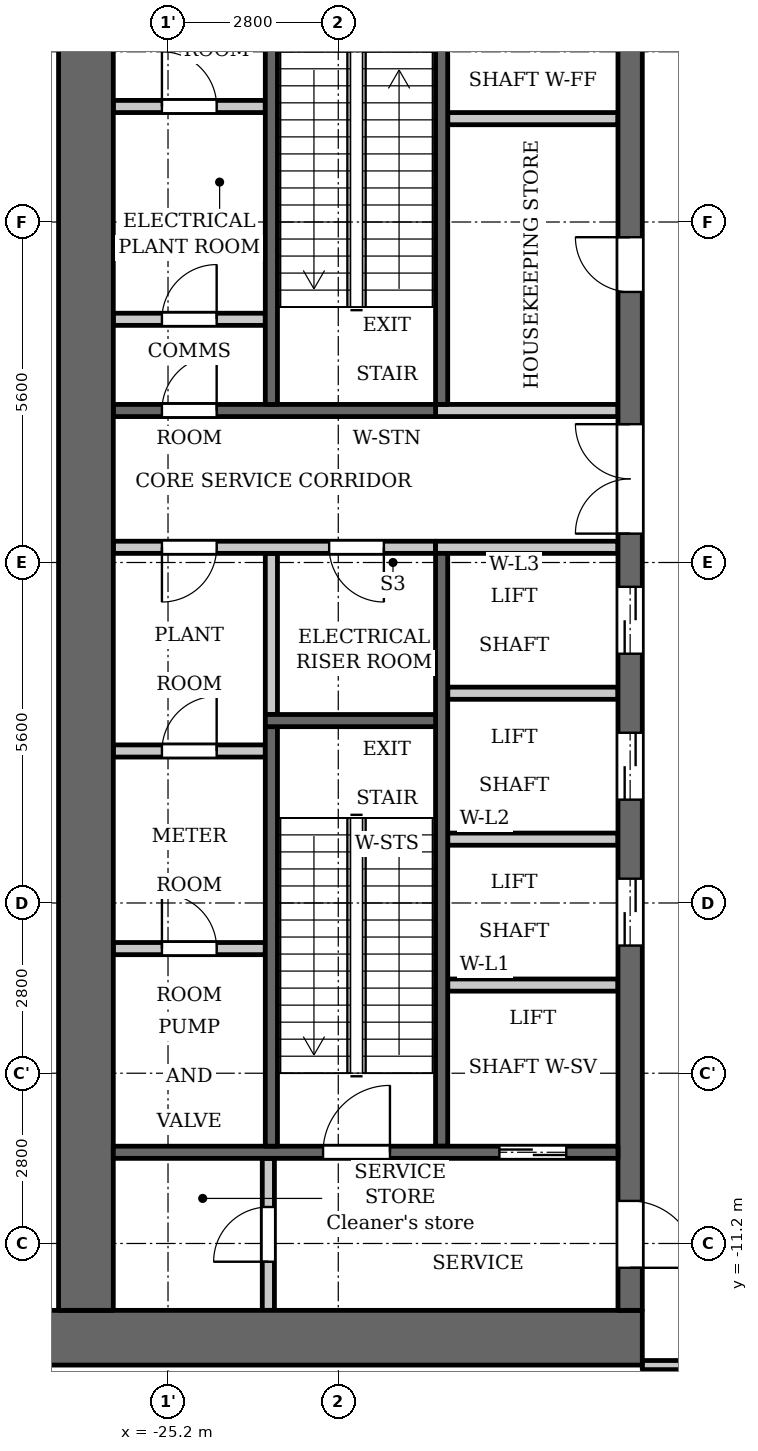
"""IFC4 building model, lengths in metres.
Left out: names, types, materials, properties, quantities, classifications, styles, units other than length and angle.
Written with IfcOpenShell. Run it as: python <this file> out.ifc"""

import sys

from ifc_helpers import new_model, si_unit, direction, frame, frame_2d, origin, place, context, subcontext, project, spatial, rectangle, extrude, element, fill, save


model = new_model("IFC4")
c1 = context("Model", 3, precision=1e-05, world=origin(), true_north=direction((0.0, 1.0)))
c2 = subcontext(c1, "Body", "Model", "MODEL_VIEW")
j1 = project(units=[si_unit("LENGTHUNIT", "METRE"), si_unit("PLANEANGLEUNIT", "RADIAN")], contexts=[c1])
p1 = place(None, origin())
s1 = spatial("IfcSite", under=j1, at=p1, CompositionType="ELEMENT")
p2 = place(p1, origin())
s2 = spatial("IfcBuilding", under=s1, at=p2, CompositionType="ELEMENT")
p3 = place(p2, frame((0.0, 0.0, 72.5)))
s3 = spatial("IfcBuildingStorey", under=s2, at=p3, CompositionType="ELEMENT", Elevation=72.5)
p4 = place(p3, frame((-23.5, -2.5, 0.0), z_axis=(0.0, 0.0, 1.0), x_axis=(0.0, 1.0, 0.0)))
e1 = element("IfcWall", 1, at=p4, inside=s3, PredefinedType="PARTITIONING", context=c2, shape_type="SweptSolid", body=[
    extrude(rectangle(XDim=2.65, YDim=0.2, at=frame_2d((1.325, 0.0))), origin(), (0.0, 0.0, 1.0), 4.95),
])
p5 = place(p3, frame((-20.7, 2.6, 0.0), z_axis=(0.0, 0.0, 1.0), x_axis=(0.0, 1.0, 0.0)))
e2 = element("IfcWall", 2, at=p5, inside=s3, PredefinedType="SHEAR", context=c2, shape_type="SweptSolid", body=[
    extrude(rectangle(XDim=7.0, YDim=0.2, at=frame_2d((3.5, 0.0))), origin(), (0.0, 0.0, 1.0), 4.95),
])
p6 = place(p3, frame((-20.7, -9.6, 0.0), z_axis=(0.0, 0.0, 1.0), x_axis=(0.0, 1.0, 0.0)))
e3 = element("IfcWall", 3, at=p6, inside=s3, PredefinedType="SHEAR", context=c2, shape_type="SweptSolid", body=[
    extrude(rectangle(XDim=9.75, YDim=0.2, at=frame_2d((4.875, 0.0))), origin(), (0.0, 0.0, 1.0), 4.95),
])
p7 = place(p3, frame((-20.8, 2.5, 0.0), z_axis=(0.0, 0.0, 1.0), x_axis=(-1.0, 0.0, 0.0)))
e4 = element("IfcWall", 4, at=p7, inside=s3, PredefinedType="SHEAR", context=c2, shape_type="SweptSolid", body=[
    extrude(rectangle(XDim=5.3, YDim=0.2, at=frame_2d((2.65, 0.0))), origin(), (0.0, 0.0, 1.0), 4.95),
])
p8 = place(p7, frame((3.6, 0.0, 0.0)))
e5 = element("IfcOpeningElement", 5, at=p8, cuts=e4, PredefinedType="OPENING", context=c2, shape_type="SweptSolid", body=[
    extrude(rectangle(XDim=0.9, YDim=2.1, at=frame_2d((0.45, 1.05))), frame((0.0, 0.11, 0.0), z_axis=(0.0, -1.0, 0.0), x_axis=(1.0, 0.0, 0.0)), (0.0, 0.0, 1.0), 0.22),
])
p9 = place(p3, frame((-20.8, 0.25, 0.0), z_axis=(0.0, 0.0, 1.0), x_axis=(-1.0, 0.0, 0.0)))
e6 = element("IfcWall", 6, at=p9, inside=s3, PredefinedType="PARTITIONING", context=c2, shape_type="SweptSolid", body=[
    extrude(rectangle(XDim=5.3, YDim=0.2, at=frame_2d((2.65, 0.0))), origin(), (0.0, 0.0, 1.0), 4.95),
])
p10 = place(p9, frame((0.85, 0.0, 0.0)))
e7 = element("IfcOpeningElement", 7, at=p10, cuts=e6, PredefinedType="OPENING", context=c2, shape_type="SweptSolid", body=[
    extrude(rectangle(XDim=0.9, YDim=2.1, at=frame_2d((0.45, 1.05))), frame((0.0, 0.11, 0.0), z_axis=(0.0, -1.0, 0.0), x_axis=(1.0, 0.0, 0.0)), (0.0, 0.0, 1.0), 0.22),
])
p11 = place(p9, frame((3.6, 0.0, 0.0)))
e8 = element("IfcOpeningElement", 8, at=p11, cuts=e6, PredefinedType="OPENING", context=c2, shape_type="SweptSolid", body=[
    extrude(rectangle(XDim=0.9, YDim=2.1, at=frame_2d((0.45, 1.05))), frame((0.0, 0.11, 0.0), z_axis=(0.0, -1.0, 0.0), x_axis=(1.0, 0.0, 0.0)), (0.0, 0.0, 1.0), 0.22),
])
p12 = place(p3, frame((-17.4, -12.75, 0.0), z_axis=(0.0, 0.0, 1.0), x_axis=(-1.0, 0.0, 0.0)))
e9 = element("IfcWall", 9, at=p12, inside=s3, PredefinedType="SHEAR", context=c2, shape_type="SweptSolid", body=[
    extrude(rectangle(XDim=10.4, YDim=0.9, at=frame_2d((5.2, 0.0))), origin(), (0.0, 0.0, 1.0), 4.95),
])
p13 = place(p3, frame((-17.6, -12.3, 0.0), z_axis=(0.0, 0.0, 1.0), x_axis=(0.0, 1.0, 0.0)))
e10 = element("IfcWall", 10, at=p13, inside=s3, PredefinedType="SHEAR", context=c2, shape_type="SweptSolid", body=[
    extrude(rectangle(XDim=24.6, YDim=0.4, at=frame_2d((12.3, 0.0))), origin(), (0.0, 0.0, 1.0), 4.95),
])
p14 = place(p13, frame((6.0, 0.0, 0.0)))
e11 = element("IfcOpeningElement", 11, at=p14, cuts=e10, PredefinedType="OPENING", context=c2, shape_type="SweptSolid", body=[
    extrude(rectangle(XDim=1.1, YDim=2.1, at=frame_2d((0.55, 1.05))), frame((0.0, 0.21, 0.0), z_axis=(0.0, -1.0, 0.0), x_axis=(1.0, 0.0, 0.0)), (0.0, 0.0, 1.0), 0.42),
])
p15 = place(p13, frame((8.4, 0.0, 0.0)))
e12 = element("IfcOpeningElement", 12, at=p15, cuts=e10, PredefinedType="OPENING", context=c2, shape_type="SweptSolid", body=[
    extrude(rectangle(XDim=1.1, YDim=2.1, at=frame_2d((0.55, 1.05))), frame((0.0, 0.21, 0.0), z_axis=(0.0, -1.0, 0.0), x_axis=(1.0, 0.0, 0.0)), (0.0, 0.0, 1.0), 0.42),
])
p16 = place(p13, frame((10.8, 0.0, 0.0)))
e13 = element("IfcOpeningElement", 13, at=p16, cuts=e10, PredefinedType="OPENING", context=c2, shape_type="SweptSolid", body=[
    extrude(rectangle(XDim=1.1, YDim=2.1, at=frame_2d((0.55, 1.05))), frame((0.0, 0.21, 0.0), z_axis=(0.0, -1.0, 0.0), x_axis=(1.0, 0.0, 0.0)), (0.0, 0.0, 1.0), 0.42),
])
p17 = place(p13, frame((16.75, 0.0, 0.0)))
e14 = element("IfcOpeningElement", 14, at=p17, cuts=e10, PredefinedType="OPENING", context=c2, shape_type="SweptSolid", body=[
    extrude(rectangle(XDim=0.9, YDim=2.1, at=frame_2d((0.45, 1.05))), frame((0.0, 0.21, 0.0), z_axis=(0.0, -1.0, 0.0), x_axis=(1.0, 0.0, 0.0)), (0.0, 0.0, 1.0), 0.42),
])
p18 = place(p13, frame((22.8, 0.0, 0.0)))
e15 = element("IfcOpeningElement", 15, at=p18, cuts=e10, PredefinedType="OPENING", context=c2, shape_type="SweptSolid", body=[
    extrude(rectangle(XDim=1.1, YDim=2.1, at=frame_2d((0.55, 1.05))), frame((0.0, 0.21, 0.0), z_axis=(0.0, -1.0, 0.0), x_axis=(1.0, 0.0, 0.0)), (0.0, 0.0, 1.0), 0.42),
])
p19 = place(p13, frame((0.7, 0.0, 0.0)))
e16 = element("IfcOpeningElement", 16, at=p19, cuts=e10, PredefinedType="OPENING", context=c2, shape_type="SweptSolid", body=[
    extrude(rectangle(XDim=1.1, YDim=2.1, at=frame_2d((0.55, 1.05))), frame((0.0, 0.21, 0.0), z_axis=(0.0, -1.0, 0.0), x_axis=(1.0, 0.0, 0.0)), (0.0, 0.0, 1.0), 0.42),
])
p20 = place(p13, frame((12.775, 0.0, 0.0)))
e17 = element("IfcOpeningElement", 17, at=p20, cuts=e10, PredefinedType="OPENING", context=c2, shape_type="SweptSolid", body=[
    extrude(rectangle(XDim=1.8, YDim=2.1, at=frame_2d((0.9, 1.05))), frame((0.0, 0.21, 0.0), z_axis=(0.0, -1.0, 0.0), x_axis=(1.0, 0.0, 0.0)), (0.0, 0.0, 1.0), 0.42),
])
p21 = place(p3, frame((-26.55, -12.3, 0.0), z_axis=(0.0, 0.0, 1.0), x_axis=(0.0, 1.0, 0.0)))
e18 = element("IfcWall", 18, at=p21, inside=s3, PredefinedType="SHEAR", context=c2, shape_type="SweptSolid", body=[
    extrude(rectangle(XDim=24.6, YDim=0.9, at=frame_2d((12.3, 0.0))), origin(), (0.0, 0.0, 1.0), 4.95),
])
p22 = place(p3, frame((-23.55, -12.3, 0.0), z_axis=(0.0, 0.0, 1.0), x_axis=(0.0, 1.0, 0.0)))
e19 = element("IfcWall", 19, at=p22, inside=s3, PredefinedType="PARTITIONING", context=c2, shape_type="SweptSolid", body=[
    extrude(rectangle(XDim=2.5, YDim=0.2, at=frame_2d((1.25, 0.0))), origin(), (0.0, 0.0, 1.0), 4.95),
])
p23 = place(p22, frame((0.8, 0.0, 0.0)))
e20 = element("IfcOpeningElement", 20, at=p23, cuts=e19, PredefinedType="OPENING", context=c2, shape_type="SweptSolid", body=[
    extrude(rectangle(XDim=0.9, YDim=2.1, at=frame_2d((0.45, 1.05))), frame((0.0, 0.11, 0.0), z_axis=(0.0, -1.0, 0.0), x_axis=(1.0, 0.0, 0.0)), (0.0, 0.0, 1.0), 0.22),
])
p24 = place(p3, frame((-23.6, -6.35, 0.0), z_axis=(0.0, 0.0, 1.0), x_axis=(-1.0, 0.0, 0.0)))
e21 = element("IfcWall", 21, at=p24, inside=s3, PredefinedType="PARTITIONING", context=c2, shape_type="SweptSolid", body=[
    extrude(rectangle(XDim=2.5, YDim=0.2, at=frame_2d((1.25, 0.0))), origin(), (0.0, 0.0, 1.0), 4.95),
])
p25 = place(p24, frame((0.8, 0.0, 0.0)))
e22 = element("IfcOpeningElement", 22, at=p25, cuts=e21, PredefinedType="OPENING", context=c2, shape_type="SweptSolid", body=[
    extrude(rectangle(XDim=0.9, YDim=2.1, at=frame_2d((0.45, 1.05))), frame((0.0, 0.11, 0.0), z_axis=(0.0, -1.0, 0.0), x_axis=(1.0, 0.0, 0.0)), (0.0, 0.0, 1.0), 0.22),
])
p26 = place(p3, frame((-23.6, -3.1, 0.0), z_axis=(0.0, 0.0, 1.0), x_axis=(-1.0, 0.0, 0.0)))
e23 = element("IfcWall", 23, at=p26, inside=s3, PredefinedType="PARTITIONING", context=c2, shape_type="SweptSolid", body=[
    extrude(rectangle(XDim=2.5, YDim=0.2, at=frame_2d((1.25, 0.0))), origin(), (0.0, 0.0, 1.0), 4.95),
])
p27 = place(p26, frame((0.8, 0.0, 0.0)))
e24 = element("IfcOpeningElement", 24, at=p27, cuts=e23, PredefinedType="OPENING", context=c2, shape_type="SweptSolid", body=[
    extrude(rectangle(XDim=0.9, YDim=2.1, at=frame_2d((0.45, 1.05))), frame((0.0, 0.11, 0.0), z_axis=(0.0, -1.0, 0.0), x_axis=(1.0, 0.0, 0.0)), (0.0, 0.0, 1.0), 0.22),
])
p28 = place(p3, frame((-23.6, 4.0, 0.0), z_axis=(0.0, 0.0, 1.0), x_axis=(-1.0, 0.0, 0.0)))
e25 = element("IfcWall", 25, at=p28, inside=s3, PredefinedType="PARTITIONING", context=c2, shape_type="SweptSolid", body=[
    extrude(rectangle(XDim=2.5, YDim=0.2, at=frame_2d((1.25, 0.0))), origin(), (0.0, 0.0, 1.0), 4.95),
])
p29 = place(p28, frame((0.8, 0.0, 0.0)))
e26 = element("IfcOpeningElement", 26, at=p29, cuts=e25, PredefinedType="OPENING", context=c2, shape_type="SweptSolid", body=[
    extrude(rectangle(XDim=0.9, YDim=2.1, at=frame_2d((0.45, 1.05))), frame((0.0, 0.11, 0.0), z_axis=(0.0, -1.0, 0.0), x_axis=(1.0, 0.0, 0.0)), (0.0, 0.0, 1.0), 0.22),
])
p30 = place(p3, frame((-23.6, 7.5, 0.0), z_axis=(0.0, 0.0, 1.0), x_axis=(-1.0, 0.0, 0.0)))
e27 = element("IfcWall", 27, at=p30, inside=s3, PredefinedType="PARTITIONING", context=c2, shape_type="SweptSolid", body=[
    extrude(rectangle(XDim=2.5, YDim=0.2, at=frame_2d((1.25, 0.0))), origin(), (0.0, 0.0, 1.0), 4.95),
])
p31 = place(p30, frame((0.8, 0.0, 0.0)))
e28 = element("IfcOpeningElement", 28, at=p31, cuts=e27, PredefinedType="OPENING", context=c2, shape_type="SweptSolid", body=[
    extrude(rectangle(XDim=0.9, YDim=2.1, at=frame_2d((0.45, 1.05))), frame((0.0, 0.11, 0.0), z_axis=(0.0, -1.0, 0.0), x_axis=(1.0, 0.0, 0.0)), (0.0, 0.0, 1.0), 0.22),
])
p32 = place(p3, frame((-17.8, -9.7, 0.0), z_axis=(0.0, 0.0, 1.0), x_axis=(-1.0, 0.0, 0.0)))
e29 = element("IfcWall", 29, at=p32, inside=s3, PredefinedType="SHEAR", context=c2, shape_type="SweptSolid", body=[
    extrude(rectangle(XDim=8.3, YDim=0.2, at=frame_2d((4.15, 0.0))), origin(), (0.0, 0.0, 1.0), 4.95),
])
p33 = place(p32, frame((0.85, 0.0, 0.0)))
e30 = element("IfcOpeningElement", 30, at=p33, cuts=e29, PredefinedType="OPENING", context=c2, shape_type="SweptSolid", body=[
    extrude(rectangle(XDim=1.1, YDim=2.1, at=frame_2d((0.55, 1.05))), frame((0.0, 0.11, 0.0), z_axis=(0.0, -1.0, 0.0), x_axis=(1.0, 0.0, 0.0)), (0.0, 0.0, 1.0), 0.22),
])
p34 = place(p32, frame((3.75, 0.0, 0.0)))
e31 = element("IfcOpeningElement", 31, at=p34, cuts=e29, PredefinedType="OPENING", context=c2, shape_type="SweptSolid", body=[
    extrude(rectangle(XDim=1.1, YDim=2.1, at=frame_2d((0.55, 1.05))), frame((0.0, 0.11, 0.0), z_axis=(0.0, -1.0, 0.0), x_axis=(1.0, 0.0, 0.0)), (0.0, 0.0, 1.0), 0.22),
])
for number, where, z_axis, x_axis in (
    (32, (-17.8, -6.95, 0.0), (0.0, 0.0, 1.0), (-1.0, 0.0, 0.0)),
    (33, (-17.8, -4.55, 0.0), (0.0, 0.0, 1.0), (-1.0, 0.0, 0.0)),
    (34, (-17.8, -2.15, 0.0), (0.0, 0.0, 1.0), (-1.0, 0.0, 0.0)),
):
    element("IfcWall", number, at=place(p3, frame(where, z_axis=z_axis, x_axis=x_axis)), inside=s3, PredefinedType="PARTITIONING", context=c2, shape_type="SweptSolid", body=[
        extrude(rectangle(XDim=2.8, YDim=0.2, at=frame_2d((1.4, 0.0))), origin(), (0.0, 0.0, 1.0), 4.95),
    ])
for number, where, z_axis, x_axis in (
    (35, (-17.8, 0.25, 0.0), (0.0, 0.0, 1.0), (-1.0, 0.0, 0.0)),
    (36, (-17.8, 2.5, 0.0), (0.0, 0.0, 1.0), (-1.0, 0.0, 0.0)),
):
    element("IfcWall", number, at=place(p3, frame(where, z_axis=z_axis, x_axis=x_axis)), inside=s3, PredefinedType="PARTITIONING", context=c2, shape_type="SweptSolid", body=[
        extrude(rectangle(XDim=3.0, YDim=0.2, at=frame_2d((1.5, 0.0))), origin(), (0.0, 0.0, 1.0), 4.95),
    ])
p35 = place(p3, frame((-17.8, 7.3, 0.0), z_axis=(0.0, 0.0, 1.0), x_axis=(-1.0, 0.0, 0.0)))
e37 = element("IfcWall", 37, at=p35, inside=s3, PredefinedType="PARTITIONING", context=c2, shape_type="SweptSolid", body=[
    extrude(rectangle(XDim=2.8, YDim=0.2, at=frame_2d((1.4, 0.0))), origin(), (0.0, 0.0, 1.0), 4.95),
])
p36 = place(p3, frame((-23.5, 2.6, 0.0), z_axis=(0.0, 0.0, 1.0), x_axis=(0.0, 1.0, 0.0)))
e38 = element("IfcWall", 38, at=p36, inside=s3, PredefinedType="SHEAR", context=c2, shape_type="SweptSolid", body=[
    extrude(rectangle(XDim=7.0, YDim=0.2, at=frame_2d((3.5, 0.0))), origin(), (0.0, 0.0, 1.0), 4.95),
])
p37 = place(p3, frame((-23.5, -9.6, 0.0), z_axis=(0.0, 0.0, 1.0), x_axis=(0.0, 1.0, 0.0)))
e39 = element("IfcWall", 39, at=p37, inside=s3, PredefinedType="SHEAR", context=c2, shape_type="SweptSolid", body=[
    extrude(rectangle(XDim=6.9, YDim=0.2, at=frame_2d((3.45, 0.0))), origin(), (0.0, 0.0, 1.0), 4.95),
])
p38 = place(p3, frame((-20.8, -2.6, 0.0), z_axis=(0.0, 0.0, 1.0), x_axis=(-1.0, 0.0, 0.0)))
e40 = element("IfcWall", 40, at=p38, inside=s3, PredefinedType="SHEAR", context=c2, shape_type="SweptSolid", body=[
    extrude(rectangle(XDim=2.8, YDim=0.2, at=frame_2d((1.4, 0.0))), origin(), (0.0, 0.0, 1.0), 4.95),
])
p39 = place(p3, frame((-17.4, -13.2, 0.0), z_axis=(0.0, 0.0, 1.0), x_axis=(1.0, 0.0, 0.0)))
e41 = element("IfcWall", 41, at=p39, inside=s3, PredefinedType="PARTITIONING", context=c2, shape_type="SweptSolid", body=[
    extrude(rectangle(XDim=6.016, YDim=0.15, at=frame_2d((3.008, 0.0))), origin(), (0.0, 0.0, 1.0), 4.95),
])
p40 = place(p39, frame((0.65, 0.0, 0.0)))
e42 = element("IfcOpeningElement", 42, at=p40, cuts=e41, PredefinedType="OPENING", context=c2, shape_type="SweptSolid", body=[
    extrude(rectangle(XDim=1.2, YDim=2.1, at=frame_2d((0.6, 1.05))), frame((0.0, 0.085, 0.0), z_axis=(0.0, -1.0, 0.0), x_axis=(1.0, 0.0, 0.0)), (0.0, 0.0, 1.0), 0.17),
])
p41 = place(p39, frame((4.71, 0.0, 0.0)))
e43 = element("IfcOpeningElement", 43, at=p41, cuts=e41, PredefinedType="OPENING", context=c2, shape_type="SweptSolid", body=[
    extrude(rectangle(XDim=1.0, YDim=2.1, at=frame_2d((0.5, 1.05))), frame((0.0, 0.085, 0.0), z_axis=(0.0, -1.0, 0.0), x_axis=(1.0, 0.0, 0.0)), (0.0, 0.0, 1.0), 0.17),
])
p42 = place(p39, frame((2.9, 0.0, 0.0)))
e44 = element("IfcOpeningElement", 44, at=p42, cuts=e41, PredefinedType="OPENING", context=c2, shape_type="SweptSolid", body=[
    extrude(rectangle(XDim=1.0, YDim=2.1, at=frame_2d((0.5, 1.05))), frame((0.0, 0.085, 0.0), z_axis=(0.0, -1.0, 0.0), x_axis=(1.0, 0.0, 0.0)), (0.0, 0.0, 1.0), 0.17),
])
p43 = place(p33, origin())
e45 = element("IfcDoor", 45, at=p43, inside=s3, OperationType="DOUBLE_DOOR_SLIDING", PredefinedType="DOOR", context=c2, shape_type="SweptSolid", body=[
    extrude(rectangle(XDim=1.1, YDim=2.1, at=frame_2d((0.55, 1.05))), frame((0.0, 0.025, 0.0), z_axis=(0.0, -1.0, 0.0), x_axis=(1.0, 0.0, 0.0)), (0.0, 0.0, 1.0), 0.05),
])
fill(e30, e45)
p44 = place(p14, origin())
e46 = element("IfcDoor", 46, at=p44, inside=s3, OperationType="DOUBLE_DOOR_SLIDING", PredefinedType="DOOR", context=c2, shape_type="SweptSolid", body=[
    extrude(rectangle(XDim=1.1, YDim=2.1, at=frame_2d((0.55, 1.05))), frame((0.0, 0.025, 0.0), z_axis=(0.0, -1.0, 0.0), x_axis=(1.0, 0.0, 0.0)), (0.0, 0.0, 1.0), 0.05),
])
fill(e11, e46)
p45 = place(p15, origin())
e47 = element("IfcDoor", 47, at=p45, inside=s3, OperationType="DOUBLE_DOOR_SLIDING", PredefinedType="DOOR", context=c2, shape_type="SweptSolid", body=[
    extrude(rectangle(XDim=1.1, YDim=2.1, at=frame_2d((0.55, 1.05))), frame((0.0, 0.025, 0.0), z_axis=(0.0, -1.0, 0.0), x_axis=(1.0, 0.0, 0.0)), (0.0, 0.0, 1.0), 0.05),
])
fill(e12, e47)
p46 = place(p16, origin())
e48 = element("IfcDoor", 48, at=p46, inside=s3, OperationType="DOUBLE_DOOR_SLIDING", PredefinedType="DOOR", context=c2, shape_type="SweptSolid", body=[
    extrude(rectangle(XDim=1.1, YDim=2.1, at=frame_2d((0.55, 1.05))), frame((0.0, 0.025, 0.0), z_axis=(0.0, -1.0, 0.0), x_axis=(1.0, 0.0, 0.0)), (0.0, 0.0, 1.0), 0.05),
])
fill(e13, e48)
p47 = place(p17, origin())
e49 = element("IfcDoor", 49, at=p47, inside=s3, OperationType="SINGLE_SWING_LEFT", PredefinedType="DOOR", context=c2, shape_type="SweptSolid", body=[
    extrude(rectangle(XDim=0.9, YDim=2.1, at=frame_2d((0.45, 1.05))), frame((0.0, 0.025, 0.0), z_axis=(0.0, -1.0, 0.0), x_axis=(1.0, 0.0, 0.0)), (0.0, 0.0, 1.0), 0.05),
])
fill(e14, e49)
p48 = place(p19, origin())
e50 = element("IfcDoor", 50, at=p48, inside=s3, OperationType="SINGLE_SWING_LEFT", PredefinedType="DOOR", context=c2, shape_type="SweptSolid", body=[
    extrude(rectangle(XDim=1.1, YDim=2.1, at=frame_2d((0.55, 1.05))), frame((0.0, 0.025, 0.0), z_axis=(0.0, -1.0, 0.0), x_axis=(1.0, 0.0, 0.0)), (0.0, 0.0, 1.0), 0.05),
])
fill(e16, e50)
p49 = place(p23, origin())
e51 = element("IfcDoor", 51, at=p49, inside=s3, OperationType="SINGLE_SWING_RIGHT", PredefinedType="DOOR", context=c2, shape_type="SweptSolid", body=[
    extrude(rectangle(XDim=0.9, YDim=2.1, at=frame_2d((0.45, 1.05))), frame((0.0, 0.025, 0.0), z_axis=(0.0, -1.0, 0.0), x_axis=(1.0, 0.0, 0.0)), (0.0, 0.0, 1.0), 0.05),
])
fill(e20, e51)
p50 = place(p34, origin())
e52 = element("IfcDoor", 52, at=p50, inside=s3, OperationType="SINGLE_SWING_LEFT", PredefinedType="DOOR", context=c2, shape_type="SweptSolid", body=[
    extrude(rectangle(XDim=1.1, YDim=2.1, at=frame_2d((0.55, 1.05))), frame((0.0, 0.025, 0.0), z_axis=(0.0, -1.0, 0.0), x_axis=(1.0, 0.0, 0.0)), (0.0, 0.0, 1.0), 0.05),
])
fill(e31, e52)
p51 = place(p20, origin())
e53 = element("IfcDoor", 53, at=p51, inside=s3, OperationType="DOUBLE_DOOR_SINGLE_SWING", PredefinedType="DOOR", context=c2, shape_type="SweptSolid", body=[
    extrude(rectangle(XDim=1.8, YDim=2.1, at=frame_2d((0.9, 1.05))), frame((0.0, 0.025, 0.0), z_axis=(0.0, -1.0, 0.0), x_axis=(1.0, 0.0, 0.0)), (0.0, 0.0, 1.0), 0.05),
])
fill(e17, e53)
p52 = place(p10, origin())
e54 = element("IfcDoor", 54, at=p52, inside=s3, OperationType="SINGLE_SWING_RIGHT", PredefinedType="DOOR", context=c2, shape_type="SweptSolid", body=[
    extrude(rectangle(XDim=0.9, YDim=2.1, at=frame_2d((0.45, 1.05))), frame((0.0, 0.025, 0.0), z_axis=(0.0, -1.0, 0.0), x_axis=(1.0, 0.0, 0.0)), (0.0, 0.0, 1.0), 0.05),
])
fill(e7, e54)
p53 = place(p25, origin())
e55 = element("IfcDoor", 55, at=p53, inside=s3, OperationType="SINGLE_SWING_RIGHT", PredefinedType="DOOR", context=c2, shape_type="SweptSolid", body=[
    extrude(rectangle(XDim=0.9, YDim=2.1, at=frame_2d((0.45, 1.05))), frame((0.0, 0.025, 0.0), z_axis=(0.0, -1.0, 0.0), x_axis=(1.0, 0.0, 0.0)), (0.0, 0.0, 1.0), 0.05),
])
fill(e22, e55)
p54 = place(p27, origin())
e56 = element("IfcDoor", 56, at=p54, inside=s3, OperationType="SINGLE_SWING_LEFT", PredefinedType="DOOR", context=c2, shape_type="SweptSolid", body=[
    extrude(rectangle(XDim=0.9, YDim=2.1, at=frame_2d((0.45, 1.05))), frame((0.0, 0.025, 0.0), z_axis=(0.0, -1.0, 0.0), x_axis=(1.0, 0.0, 0.0)), (0.0, 0.0, 1.0), 0.05),
])
fill(e24, e56)
p55 = place(p11, origin())
e57 = element("IfcDoor", 57, at=p55, inside=s3, OperationType="SINGLE_SWING_LEFT", PredefinedType="DOOR", context=c2, shape_type="SweptSolid", body=[
    extrude(rectangle(XDim=0.9, YDim=2.1, at=frame_2d((0.45, 1.05))), frame((0.0, 0.025, 0.0), z_axis=(0.0, -1.0, 0.0), x_axis=(1.0, 0.0, 0.0)), (0.0, 0.0, 1.0), 0.05),
])
fill(e8, e57)
p56 = place(p29, origin())
e58 = element("IfcDoor", 58, at=p56, inside=s3, OperationType="SINGLE_SWING_LEFT", PredefinedType="DOOR", context=c2, shape_type="SweptSolid", body=[
    extrude(rectangle(XDim=0.9, YDim=2.1, at=frame_2d((0.45, 1.05))), frame((0.0, 0.025, 0.0), z_axis=(0.0, -1.0, 0.0), x_axis=(1.0, 0.0, 0.0)), (0.0, 0.0, 1.0), 0.05),
])
fill(e26, e58)
p57 = place(p31, origin())
e59 = element("IfcDoor", 59, at=p57, inside=s3, OperationType="SINGLE_SWING_RIGHT", PredefinedType="DOOR", context=c2, shape_type="SweptSolid", body=[
    extrude(rectangle(XDim=0.9, YDim=2.1, at=frame_2d((0.45, 1.05))), frame((0.0, 0.025, 0.0), z_axis=(0.0, -1.0, 0.0), x_axis=(1.0, 0.0, 0.0)), (0.0, 0.0, 1.0), 0.05),
])
fill(e28, e59)
p58 = place(p8, origin())
e60 = element("IfcDoor", 60, at=p58, inside=s3, OperationType="SINGLE_SWING_LEFT", PredefinedType="DOOR", context=c2, shape_type="SweptSolid", body=[
    extrude(rectangle(XDim=0.9, YDim=2.1, at=frame_2d((0.45, 1.05))), frame((0.0, 0.025, 0.0), z_axis=(0.0, -1.0, 0.0), x_axis=(1.0, 0.0, 0.0)), (0.0, 0.0, 1.0), 0.05),
])
fill(e5, e60)
save(model, sys.argv[1])
